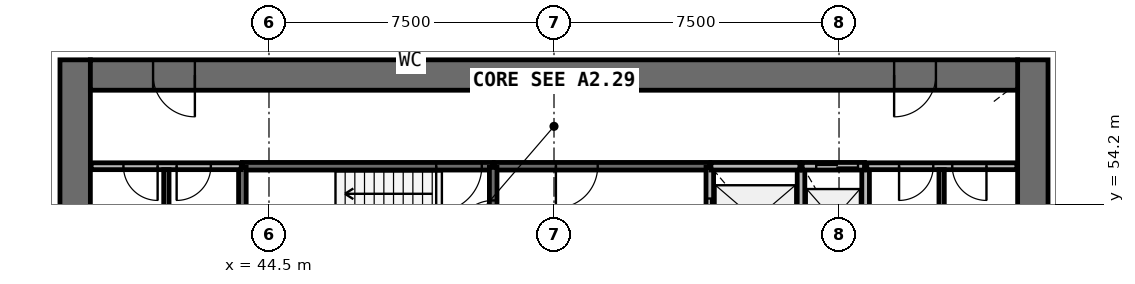
"""IFC4 building model, lengths in metres.
Left out: names, types, materials, properties, quantities, classifications, styles, units other than length and angle.
Written with IfcOpenShell. Run it as: python <this file> out.ifc"""

import sys

from ifc_helpers import new_model, si_unit, direction, frame, frame_2d, origin, place, context, subcontext, project, spatial, rectangle, extrude, source, transform, mapped, element, fill, save


model = new_model("IFC4")
c1 = context("Model", 3, precision=1e-05, world=origin(), true_north=direction((0.0, 1.0)))
c2 = subcontext(c1, "Body", "Model", "MODEL_VIEW")
j1 = project(units=[si_unit("LENGTHUNIT", "METRE"), si_unit("PLANEANGLEUNIT", "RADIAN")], contexts=[c1])
p1 = place(None, origin())
s1 = spatial("IfcSite", under=j1, at=p1, CompositionType="ELEMENT")
p2 = place(p1, origin())
s2 = spatial("IfcBuilding", under=s1, at=p2, CompositionType="ELEMENT")
p3 = place(p2, frame((0.0, 0.0, 120.8)))
s3 = spatial("IfcBuildingStorey", under=s2, at=p3, CompositionType="ELEMENT", Elevation=120.8)
p4 = place(p3, frame((64.6, 38.0, 0.0), z_axis=(0.0, 0.0, 1.0), x_axis=(0.0, 1.0, 0.0)))
e1 = element("IfcWall", 1, at=p4, inside=s3, PredefinedType="SHEAR", context=c2, shape_type="SweptSolid", body=[
    extrude(rectangle(XDim=20.0, YDim=0.8, at=frame_2d((10.0, 0.0))), origin(), (0.0, 0.0, 1.0), 4.1),
])
p5 = place(p4, frame((9.1, 0.0, 0.0)))
e2 = element("IfcOpeningElement", 2, at=p5, cuts=e1, PredefinedType="OPENING", context=c2, shape_type="SweptSolid", body=[
    extrude(rectangle(XDim=1.8, YDim=2.1, at=frame_2d((0.9, 1.05))), frame((0.0, 0.41, 0.0), z_axis=(0.0, -1.0, 0.0), x_axis=(1.0, 0.0, 0.0)), (0.0, 0.0, 1.0), 0.82),
])
p6 = place(p3, frame((39.4, 58.0, 0.0), z_axis=(0.0, 0.0, 1.0), x_axis=(0.0, -1.0, 0.0)))
e3 = element("IfcWall", 3, at=p6, inside=s3, PredefinedType="SHEAR", context=c2, shape_type="SweptSolid", body=[
    extrude(rectangle(XDim=20.0, YDim=0.8, at=frame_2d((10.0, 0.0))), origin(), (0.0, 0.0, 1.0), 4.1),
])
p7 = place(p6, frame((9.1, 0.0, 0.0)))
e4 = element("IfcOpeningElement", 4, at=p7, cuts=e3, PredefinedType="OPENING", context=c2, shape_type="SweptSolid", body=[
    extrude(rectangle(XDim=1.8, YDim=2.1, at=frame_2d((0.9, 1.05))), frame((0.0, 0.41, 0.0), z_axis=(0.0, -1.0, 0.0), x_axis=(1.0, 0.0, 0.0)), (0.0, 0.0, 1.0), 0.82),
])
p8 = place(p3, frame((64.2, 57.6, 0.0), z_axis=(0.0, 0.0, 1.0), x_axis=(-1.0, 0.0, 0.0)))
e5 = element("IfcWall", 5, at=p8, inside=s3, PredefinedType="SHEAR", context=c2, shape_type="SweptSolid", body=[
    extrude(rectangle(XDim=24.4, YDim=0.8, at=frame_2d((12.2, 0.0))), origin(), (0.0, 0.0, 1.0), 4.1),
])
p9 = place(p8, frame((21.65, 0.0, 0.0)))
e6 = element("IfcOpeningElement", 6, at=p9, cuts=e5, PredefinedType="OPENING", context=c2, shape_type="SweptSolid", body=[
    extrude(rectangle(XDim=1.1, YDim=2.1, at=frame_2d((0.55, 1.05))), frame((0.0, 0.41, 0.0), z_axis=(0.0, -1.0, 0.0), x_axis=(1.0, 0.0, 0.0)), (0.0, 0.0, 1.0), 0.82),
])
p10 = place(p8, frame((2.15, 0.0, 0.0)))
e7 = element("IfcOpeningElement", 7, at=p10, cuts=e5, PredefinedType="OPENING", context=c2, shape_type="SweptSolid", body=[
    extrude(rectangle(XDim=1.1, YDim=2.1, at=frame_2d((0.55, 1.05))), frame((0.0, 0.41, 0.0), z_axis=(0.0, -1.0, 0.0), x_axis=(1.0, 0.0, 0.0)), (0.0, 0.0, 1.0), 0.82),
])
p11 = place(p3, frame((50.4, 55.2, 0.0), z_axis=(0.0, 0.0, 1.0), x_axis=(-1.0, 0.0, 0.0)))
e8 = element("IfcWall", 8, at=p11, inside=s3, PredefinedType="SOLIDWALL", context=c2, shape_type="SweptSolid", body=[
    extrude(rectangle(XDim=6.6, YDim=0.2, at=frame_2d((3.3, 0.0))), origin(), (0.0, 0.0, 1.0), 3.7),
])
p12 = place(p11, frame((0.3, 0.0, 0.0)))
e9 = element("IfcOpeningElement", 9, at=p12, cuts=e8, PredefinedType="OPENING", context=c2, shape_type="SweptSolid", body=[
    extrude(rectangle(XDim=1.2, YDim=2.1, at=frame_2d((0.6, 1.05))), frame((0.0, 0.11, 0.0), z_axis=(0.0, -1.0, 0.0), x_axis=(1.0, 0.0, 0.0)), (0.0, 0.0, 1.0), 0.22),
])
p13 = place(p3, frame((56.1, 55.2, 0.0), z_axis=(0.0, 0.0, 1.0), x_axis=(-1.0, 0.0, 0.0)))
e10 = element("IfcWall", 10, at=p13, inside=s3, PredefinedType="SOLIDWALL", context=c2, shape_type="SweptSolid", body=[
    extrude(rectangle(XDim=5.67, YDim=0.2, at=frame_2d((2.835, 0.0))), origin(), (0.0, 0.0, 1.0), 3.7),
])
p14 = place(p13, frame((2.95, 0.0, 0.0)))
e11 = element("IfcOpeningElement", 11, at=p14, cuts=e10, PredefinedType="OPENING", context=c2, shape_type="SweptSolid", body=[
    extrude(rectangle(XDim=1.1, YDim=2.1, at=frame_2d((0.55, 1.05))), frame((0.0, 0.11, 0.0), z_axis=(0.0, -1.0, 0.0), x_axis=(1.0, 0.0, 0.0)), (0.0, 0.0, 1.0), 0.22),
])
p15 = place(p3, frame((50.4, 52.4, 0.0), z_axis=(0.0, 0.0, 1.0), x_axis=(0.0, 1.0, 0.0)))
e12 = element("IfcWall", 12, at=p15, inside=s3, PredefinedType="SOLIDWALL", context=c2, shape_type="SweptSolid", body=[
    extrude(rectangle(XDim=2.77, YDim=0.2, at=frame_2d((1.385, 0.0))), origin(), (0.0, 0.0, 1.0), 3.7),
])
p16 = place(p15, frame((0.9, 0.0, 0.0)))
e13 = element("IfcOpeningElement", 13, at=p16, cuts=e12, PredefinedType="OPENING", context=c2, shape_type="SweptSolid", body=[
    extrude(rectangle(XDim=1.0, YDim=2.1, at=frame_2d((0.5, 1.05))), frame((0.0, 0.11, 0.0), z_axis=(0.0, -1.0, 0.0), x_axis=(1.0, 0.0, 0.0)), (0.0, 0.0, 1.0), 0.22),
])
p17 = place(p3, frame((56.1, 55.17, 0.0), z_axis=(0.0, 0.0, 1.0), x_axis=(0.0, -1.0, 0.0)))
e14 = element("IfcWall", 14, at=p17, inside=s3, PredefinedType="SOLIDWALL", context=c2, shape_type="SweptSolid", body=[
    extrude(rectangle(XDim=2.77, YDim=0.2, at=frame_2d((1.385, 0.0))), origin(), (0.0, 0.0, 1.0), 3.7),
])
p18 = place(p17, frame((0.82, 0.0, 0.0)))
e15 = element("IfcOpeningElement", 15, at=p18, cuts=e14, PredefinedType="OPENING", context=c2, shape_type="SweptSolid", body=[
    extrude(rectangle(XDim=1.1, YDim=2.1, at=frame_2d((0.55, 1.05))), frame((0.0, 0.11, 0.0), z_axis=(0.0, -1.0, 0.0), x_axis=(1.0, 0.0, 0.0)), (0.0, 0.0, 1.0), 0.22),
])
for number, where, z_axis, x_axis in (
    (16, (58.5, 52.4, 0.0), (0.0, 0.0, 1.0), (0.0, 1.0, 0.0)),
    (17, (60.2, 52.4, 0.0), (0.0, 0.0, 1.0), (0.0, 1.0, 0.0)),
):
    element("IfcWall", number, at=place(p3, frame(where, z_axis=z_axis, x_axis=x_axis)), inside=s3, PredefinedType="SOLIDWALL", context=c2, shape_type="SweptSolid", body=[
        extrude(rectangle(XDim=2.8, YDim=0.2, at=frame_2d((1.4, 0.0))), origin(), (0.0, 0.0, 1.0), 3.7),
    ])
p19 = place(p3, frame((58.47, 55.2, 0.0), z_axis=(0.0, 0.0, 1.0), x_axis=(-1.0, 0.0, 0.0)))
e18 = element("IfcWall", 18, at=p19, inside=s3, PredefinedType="SOLIDWALL", context=c2, shape_type="SweptSolid", body=[
    extrude(rectangle(XDim=2.34, YDim=0.2, at=frame_2d((1.17, 0.0))), origin(), (0.0, 0.0, 1.0), 3.7),
])
p20 = place(p3, frame((43.8, 55.17, 0.0), z_axis=(0.0, 0.0, 1.0), x_axis=(0.0, -1.0, 0.0)))
e19 = element("IfcWall", 19, at=p20, inside=s3, PredefinedType="SOLIDWALL", context=c2, shape_type="SweptSolid", body=[
    extrude(rectangle(XDim=2.14, YDim=0.2, at=frame_2d((1.07, 0.0))), origin(), (0.0, 0.0, 1.0), 3.7),
])
p21 = place(p3, frame((60.17, 55.2, 0.0), z_axis=(0.0, 0.0, 1.0), x_axis=(-1.0, 0.0, 0.0)))
e20 = element("IfcWall", 20, at=p21, inside=s3, PredefinedType="SOLIDWALL", context=c2, shape_type="SweptSolid", body=[
    extrude(rectangle(XDim=1.64, YDim=0.2, at=frame_2d((0.82, 0.0))), origin(), (0.0, 0.0, 1.0), 3.7),
])
p22 = place(p21, frame((0.17, 0.0, 0.0)))
e21 = element("IfcOpeningElement", 21, at=p22, cuts=e20, PredefinedType="OPENING", context=c2, shape_type="SweptSolid", body=[
    extrude(rectangle(XDim=1.1, YDim=2.1, at=frame_2d((0.55, 1.05))), frame((0.0, 0.11, 0.0), z_axis=(0.0, -1.0, 0.0), x_axis=(1.0, 0.0, 0.0)), (0.0, 0.0, 1.0), 0.22),
])
p23 = place(p3, frame((64.18, 55.2, 0.0), z_axis=(0.0, 0.0, 1.0), x_axis=(-1.0, 0.0, 0.0)))
e22 = element("IfcWall", 22, at=p23, inside=s3, PredefinedType="PARTITIONING", context=c2, shape_type="SweptSolid", body=[
    extrude(rectangle(XDim=3.95, YDim=0.18, at=frame_2d((1.975, 0.0))), origin(), (0.0, 0.0, 1.0), 3.7),
])
p24 = place(p23, frame((2.2, 0.0, 0.0)))
e23 = element("IfcOpeningElement", 23, at=p24, cuts=e22, PredefinedType="OPENING", context=c2, shape_type="SweptSolid", body=[
    extrude(rectangle(XDim=0.9, YDim=2.1, at=frame_2d((0.45, 1.05))), frame((0.0, 0.1, 0.0), z_axis=(0.0, -1.0, 0.0), x_axis=(1.0, 0.0, 0.0)), (0.0, 0.0, 1.0), 0.2),
])
p25 = place(p23, frame((0.8, 0.0, 0.0)))
e24 = element("IfcOpeningElement", 24, at=p25, cuts=e22, PredefinedType="OPENING", context=c2, shape_type="SweptSolid", body=[
    extrude(rectangle(XDim=0.9, YDim=2.1, at=frame_2d((0.45, 1.05))), frame((0.0, 0.1, 0.0), z_axis=(0.0, -1.0, 0.0), x_axis=(1.0, 0.0, 0.0)), (0.0, 0.0, 1.0), 0.2),
])
p26 = place(p3, frame((43.77, 55.2, 0.0), z_axis=(0.0, 0.0, 1.0), x_axis=(-1.0, 0.0, 0.0)))
e25 = element("IfcWall", 25, at=p26, inside=s3, PredefinedType="PARTITIONING", context=c2, shape_type="SweptSolid", body=[
    extrude(rectangle(XDim=3.95, YDim=0.18, at=frame_2d((1.975, 0.0))), origin(), (0.0, 0.0, 1.0), 3.7),
])
p27 = place(p26, frame((2.2, 0.0, 0.0)))
e26 = element("IfcOpeningElement", 26, at=p27, cuts=e25, PredefinedType="OPENING", context=c2, shape_type="SweptSolid", body=[
    extrude(rectangle(XDim=0.9, YDim=2.1, at=frame_2d((0.45, 1.05))), frame((0.0, 0.1, 0.0), z_axis=(0.0, -1.0, 0.0), x_axis=(1.0, 0.0, 0.0)), (0.0, 0.0, 1.0), 0.2),
])
p28 = place(p26, frame((0.8, 0.0, 0.0)))
e27 = element("IfcOpeningElement", 27, at=p28, cuts=e25, PredefinedType="OPENING", context=c2, shape_type="SweptSolid", body=[
    extrude(rectangle(XDim=0.9, YDim=2.1, at=frame_2d((0.45, 1.05))), frame((0.0, 0.1, 0.0), z_axis=(0.0, -1.0, 0.0), x_axis=(1.0, 0.0, 0.0)), (0.0, 0.0, 1.0), 0.2),
])
p29 = place(p3, frame((62.2, 52.4, 0.0), z_axis=(0.0, 0.0, 1.0), x_axis=(0.0, 1.0, 0.0)))
e28 = element("IfcWall", 28, at=p29, inside=s3, PredefinedType="PARTITIONING", context=c2, shape_type="SweptSolid", body=[
    extrude(rectangle(XDim=2.71, YDim=0.14, at=frame_2d((1.355, 0.0))), origin(), (0.0, 0.0, 1.0), 2.9),
])
p30 = place(p3, frame((41.8, 53.1, 0.0), z_axis=(0.0, 0.0, 1.0), x_axis=(0.0, 1.0, 0.0)))
e29 = element("IfcWall", 29, at=p30, inside=s3, PredefinedType="PARTITIONING", context=c2, shape_type="SweptSolid", body=[
    extrude(rectangle(XDim=2.01, YDim=0.14, at=frame_2d((1.005, 0.0))), origin(), (0.0, 0.0, 1.0), 2.9),
])
m1 = source(origin(), c2, "Body", "SweptSolid", [
    extrude(rectangle(XDim=1.1, YDim=2.1, at=frame_2d((0.55, 1.05))), frame((0.0, 0.025, 0.0), z_axis=(0.0, -1.0, 0.0), x_axis=(1.0, 0.0, 0.0)), (0.0, 0.0, 1.0), 0.05),
])
p31 = place(p18, origin())
e30 = element("IfcDoor", 30, at=p31, inside=s3, OperationType="DOUBLE_DOOR_SLIDING", PredefinedType="USERDEFINED", context=c2, shape_type="MappedRepresentation", body=[
    mapped(m1, transform((0.0, 0.0, 0.0), scale=1.0)),
])
fill(e15, e30)
p32 = place(p22, origin())
e31 = element("IfcDoor", 31, at=p32, inside=s3, OperationType="DOUBLE_DOOR_SLIDING", PredefinedType="USERDEFINED", context=c2, shape_type="MappedRepresentation", body=[
    mapped(m1, transform((0.0, 0.0, 0.0), scale=1.0)),
])
fill(e21, e31)
m2 = source(origin(), c2, "Body", "SweptSolid", [
    extrude(rectangle(XDim=1.2, YDim=2.1, at=frame_2d((0.6, 1.05))), frame((0.0, 0.025, 0.0), z_axis=(0.0, -1.0, 0.0), x_axis=(1.0, 0.0, 0.0)), (0.0, 0.0, 1.0), 0.05),
])
p33 = place(p12, origin())
e32 = element("IfcDoor", 32, at=p33, inside=s3, OperationType="SINGLE_SWING_RIGHT", PredefinedType="DOOR", context=c2, shape_type="MappedRepresentation", body=[
    mapped(m2, transform((0.0, 0.0, 0.0), scale=1.0)),
])
fill(e9, e32)
m3 = source(origin(), c2, "Body", "SweptSolid", [
    extrude(rectangle(XDim=1.0, YDim=2.1, at=frame_2d((0.5, 1.05))), frame((0.0, 0.025, 0.0), z_axis=(0.0, -1.0, 0.0), x_axis=(1.0, 0.0, 0.0)), (0.0, 0.0, 1.0), 0.05),
])
p34 = place(p16, origin())
e33 = element("IfcDoor", 33, at=p34, inside=s3, OperationType="SINGLE_SWING_LEFT", PredefinedType="DOOR", context=c2, shape_type="MappedRepresentation", body=[
    mapped(m3, transform((0.0, 0.0, 0.0), scale=1.0)),
])
fill(e13, e33)
m4 = source(origin(), c2, "Body", "SweptSolid", [
    extrude(rectangle(XDim=1.1, YDim=2.1, at=frame_2d((0.55, 1.05))), frame((0.0, 0.025, 0.0), z_axis=(0.0, -1.0, 0.0), x_axis=(1.0, 0.0, 0.0)), (0.0, 0.0, 1.0), 0.05),
])
p35 = place(p14, origin())
e34 = element("IfcDoor", 34, at=p35, inside=s3, OperationType="SINGLE_SWING_RIGHT", PredefinedType="DOOR", context=c2, shape_type="MappedRepresentation", body=[
    mapped(m4, transform((0.0, 0.0, 0.0), scale=1.0)),
])
fill(e11, e34)
m5 = source(origin(), c2, "Body", "SweptSolid", [
    extrude(rectangle(XDim=1.1, YDim=2.1, at=frame_2d((0.55, 1.05))), frame((0.0, 0.025, 0.0), z_axis=(0.0, -1.0, 0.0), x_axis=(1.0, 0.0, 0.0)), (0.0, 0.0, 1.0), 0.05),
])
p36 = place(p9, origin())
e35 = element("IfcDoor", 35, at=p36, inside=s3, OperationType="SINGLE_SWING_LEFT", PredefinedType="DOOR", context=c2, shape_type="MappedRepresentation", body=[
    mapped(m5, transform((0.0, 0.0, 0.0), scale=1.0)),
])
fill(e6, e35)
p37 = place(p10, origin())
e36 = element("IfcDoor", 36, at=p37, inside=s3, OperationType="SINGLE_SWING_RIGHT", PredefinedType="DOOR", context=c2, shape_type="MappedRepresentation", body=[
    mapped(m5, transform((0.0, 0.0, 0.0), scale=1.0)),
])
fill(e7, e36)
m6 = source(origin(), c2, "Body", "SweptSolid", [
    extrude(rectangle(XDim=0.9, YDim=2.1, at=frame_2d((0.45, 1.05))), frame((0.0, 0.025, 0.0), z_axis=(0.0, -1.0, 0.0), x_axis=(1.0, 0.0, 0.0)), (0.0, 0.0, 1.0), 0.05),
])
p38 = place(p27, origin())
e37 = element("IfcDoor", 37, at=p38, inside=s3, OperationType="SINGLE_SWING_LEFT", PredefinedType="DOOR", context=c2, shape_type="MappedRepresentation", body=[
    mapped(m6, transform((0.0, 0.0, 0.0), scale=1.0)),
])
fill(e26, e37)
p39 = place(p28, origin())
e38 = element("IfcDoor", 38, at=p39, inside=s3, OperationType="SINGLE_SWING_RIGHT", PredefinedType="DOOR", context=c2, shape_type="MappedRepresentation", body=[
    mapped(m6, transform((0.0, 0.0, 0.0), scale=1.0)),
])
fill(e27, e38)
p40 = place(p24, origin())
e39 = element("IfcDoor", 39, at=p40, inside=s3, OperationType="SINGLE_SWING_RIGHT", PredefinedType="DOOR", context=c2, shape_type="MappedRepresentation", body=[
    mapped(m6, transform((0.0, 0.0, 0.0), scale=1.0)),
])
fill(e23, e39)
p41 = place(p25, origin())
e40 = element("IfcDoor", 40, at=p41, inside=s3, OperationType="SINGLE_SWING_LEFT", PredefinedType="DOOR", context=c2, shape_type="MappedRepresentation", body=[
    mapped(m6, transform((0.0, 0.0, 0.0), scale=1.0)),
])
fill(e24, e40)
save(model, sys.argv[1])
